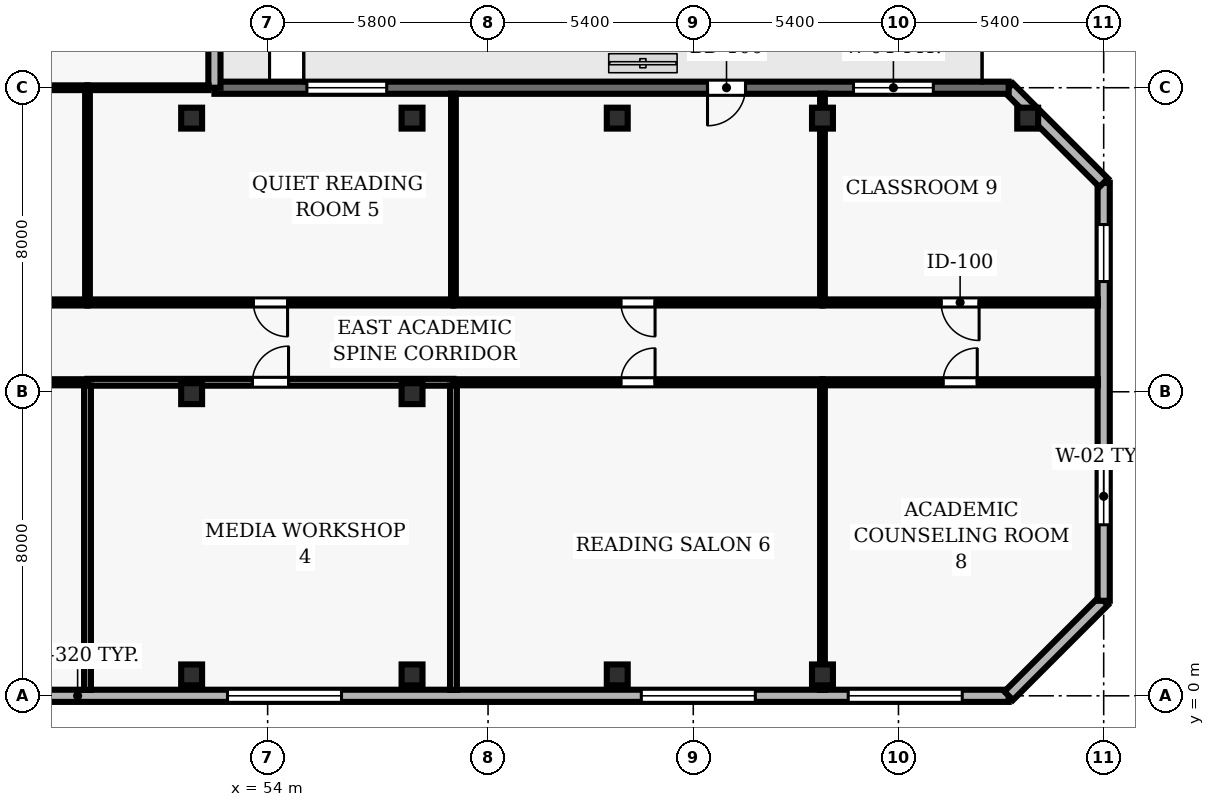
"""IFC4 building model, lengths in metres.
Left out: names, types, materials, properties, quantities, classifications, styles, units other than length and angle.
Written with IfcOpenShell. Run it as: python <this file> out.ifc"""

import sys

from ifc_helpers import new_model, si_unit, direction, frame, frame_2d, origin, origin_2d, place, context, subcontext, project, spatial, rectangle, hollow_rectangle, extrude, element, fill, save


model = new_model("IFC4")
c1 = context("Model", 3, precision=1e-05, world=origin(), true_north=direction((0.0, 1.0)))
c2 = subcontext(c1, "Body", "Model", "MODEL_VIEW")
j1 = project(units=[si_unit("LENGTHUNIT", "METRE"), si_unit("PLANEANGLEUNIT", "RADIAN")], contexts=[c1])
p1 = place(None, origin())
s1 = spatial("IfcSite", under=j1, at=p1, CompositionType="ELEMENT")
p2 = place(p1, origin())
s2 = spatial("IfcBuilding", under=s1, at=p2, CompositionType="ELEMENT")
p3 = place(p2, frame((0.0, 0.0, 50.5)))
s3 = spatial("IfcBuildingStorey", under=s2, at=p3, CompositionType="ELEMENT", Elevation=50.5)
for number, where, z_axis, x_axis in (
    (1, (52.0, 0.55, 0.0), (0.0, 0.0, 1.0), (1.0, 0.0, 0.0)),
    (2, (52.0, 7.95, 0.0), (0.0, 0.0, 1.0), (1.0, 0.0, 0.0)),
    (3, (52.0, 15.2, 0.0), (0.0, 0.0, 1.0), (1.0, 0.0, 0.0)),
    (4, (57.8, 0.55, 0.0), (0.0, 0.0, 1.0), (1.0, 0.0, 0.0)),
    (5, (57.8, 7.95, 0.0), (0.0, 0.0, 1.0), (1.0, 0.0, 0.0)),
    (6, (57.8, 15.2, 0.0), (0.0, 0.0, 1.0), (1.0, 0.0, 0.0)),
    (7, (63.2, 0.55, 0.0), (0.0, 0.0, 1.0), (1.0, 0.0, 0.0)),
    (8, (63.2, 15.2, 0.0), (0.0, 0.0, 1.0), (1.0, 0.0, 0.0)),
    (9, (68.6, 0.55, 0.0), (0.0, 0.0, 1.0), (1.0, 0.0, 0.0)),
    (10, (68.6, 15.2, 0.0), (0.0, 0.0, 1.0), (1.0, 0.0, 0.0)),
    (11, (74.0, 15.2, 0.0), (0.0, 0.0, 1.0), (1.0, 0.0, 0.0)),
):
    element("IfcColumn", number, at=place(p3, frame(where, z_axis=z_axis, x_axis=x_axis)), inside=s3, PredefinedType="COLUMN", context=c2, shape_type="SweptSolid", body=[
        extrude(hollow_rectangle(XDim=0.55, YDim=0.55, WallThickness=0.025, at=origin_2d()), origin(), (0.0, 0.0, 1.0), 3.9),
    ])
p4 = place(p3, frame((24.5, 0.0, 0.0), z_axis=(0.0, 0.0, 1.0), x_axis=(1.0, 0.0, 0.0)))
e12 = element("IfcWall", 12, at=p4, inside=s3, PredefinedType="SOLIDWALL", context=c2, shape_type="SweptSolid", body=[
    extrude(rectangle(XDim=49.0, YDim=0.32, at=frame_2d((24.5, 0.0))), origin(), (0.0, 0.0, 1.0), 3.69),
])
p5 = place(p4, frame((1.222, 0.0, 0.9)))
e13 = element("IfcOpeningElement", 13, at=p5, cuts=e12, PredefinedType="OPENING", context=c2, shape_type="SweptSolid", body=[
    extrude(rectangle(XDim=3.0, YDim=2.2, at=frame_2d((1.5, 1.1))), frame((0.0, 0.17, 0.0), z_axis=(0.0, -1.0, 0.0), x_axis=(1.0, 0.0, 0.0)), (0.0, 0.0, 1.0), 0.34),
])
p6 = place(p4, frame((17.556, 0.0, 0.9)))
e14 = element("IfcOpeningElement", 14, at=p6, cuts=e12, PredefinedType="OPENING", context=c2, shape_type="SweptSolid", body=[
    extrude(rectangle(XDim=3.0, YDim=2.2, at=frame_2d((1.5, 1.1))), frame((0.0, 0.17, 0.0), z_axis=(0.0, -1.0, 0.0), x_axis=(1.0, 0.0, 0.0)), (0.0, 0.0, 1.0), 0.34),
])
p7 = place(p4, frame((28.444, 0.0, 0.9)))
e15 = element("IfcOpeningElement", 15, at=p7, cuts=e12, PredefinedType="OPENING", context=c2, shape_type="SweptSolid", body=[
    extrude(rectangle(XDim=3.0, YDim=2.2, at=frame_2d((1.5, 1.1))), frame((0.0, 0.17, 0.0), z_axis=(0.0, -1.0, 0.0), x_axis=(1.0, 0.0, 0.0)), (0.0, 0.0, 1.0), 0.34),
])
p8 = place(p4, frame((39.333, 0.0, 0.9)))
e16 = element("IfcOpeningElement", 16, at=p8, cuts=e12, PredefinedType="OPENING", context=c2, shape_type="SweptSolid", body=[
    extrude(rectangle(XDim=3.0, YDim=2.2, at=frame_2d((1.5, 1.1))), frame((0.0, 0.17, 0.0), z_axis=(0.0, -1.0, 0.0), x_axis=(1.0, 0.0, 0.0)), (0.0, 0.0, 1.0), 0.34),
])
p9 = place(p4, frame((44.778, 0.0, 0.9)))
e17 = element("IfcOpeningElement", 17, at=p9, cuts=e12, PredefinedType="OPENING", context=c2, shape_type="SweptSolid", body=[
    extrude(rectangle(XDim=3.0, YDim=2.2, at=frame_2d((1.5, 1.1))), frame((0.0, 0.17, 0.0), z_axis=(0.0, -1.0, 0.0), x_axis=(1.0, 0.0, 0.0)), (0.0, 0.0, 1.0), 0.34),
])
p10 = place(p3, frame((73.5, 0.0, 0.0), z_axis=(0.0, 0.0, 1.0), x_axis=(0.707106781187, 0.707106781187, 0.0)))
e18 = element("IfcWall", 18, at=p10, inside=s3, PredefinedType="SOLIDWALL", context=c2, shape_type="SweptSolid", body=[
    extrude(rectangle(XDim=3.536, YDim=0.32, at=frame_2d((1.768, 0.0))), origin(), (0.0, 0.0, 1.0), 3.69),
])
p11 = place(p3, frame((76.0, 2.5, 0.0), z_axis=(0.0, 0.0, 1.0), x_axis=(0.0, 1.0, 0.0)))
e19 = element("IfcWall", 19, at=p11, inside=s3, PredefinedType="SOLIDWALL", context=c2, shape_type="SweptSolid", body=[
    extrude(rectangle(XDim=11.0, YDim=0.32, at=frame_2d((5.5, 0.0))), origin(), (0.0, 0.0, 1.0), 3.69),
])
p12 = place(p11, frame((2.0, 0.0, 0.9)))
e20 = element("IfcOpeningElement", 20, at=p12, cuts=e19, PredefinedType="OPENING", context=c2, shape_type="SweptSolid", body=[
    extrude(rectangle(XDim=1.5, YDim=1.6, at=frame_2d((0.75, 0.8))), frame((0.0, 0.17, 0.0), z_axis=(0.0, -1.0, 0.0), x_axis=(1.0, 0.0, 0.0)), (0.0, 0.0, 1.0), 0.34),
])
p13 = place(p11, frame((8.4, 0.0, 0.9)))
e21 = element("IfcOpeningElement", 21, at=p13, cuts=e19, PredefinedType="OPENING", context=c2, shape_type="SweptSolid", body=[
    extrude(rectangle(XDim=1.5, YDim=1.6, at=frame_2d((0.75, 0.8))), frame((0.0, 0.17, 0.0), z_axis=(0.0, -1.0, 0.0), x_axis=(1.0, 0.0, 0.0)), (0.0, 0.0, 1.0), 0.34),
])
p14 = place(p3, frame((76.0, 13.5, 0.0), z_axis=(0.0, 0.0, 1.0), x_axis=(-0.707106781187, 0.707106781187, 0.0)))
e22 = element("IfcWall", 22, at=p14, inside=s3, PredefinedType="SOLIDWALL", context=c2, shape_type="SweptSolid", body=[
    extrude(rectangle(XDim=3.536, YDim=0.32, at=frame_2d((1.768, 0.0))), origin(), (0.0, 0.0, 1.0), 3.69),
])
p15 = place(p3, frame((73.5, 16.0, 0.0), z_axis=(0.0, 0.0, 1.0), x_axis=(-1.0, 0.0, 0.0)))
e23 = element("IfcWall", 23, at=p15, inside=s3, PredefinedType="SOLIDWALL", context=c2, shape_type="SweptSolid", body=[
    extrude(rectangle(XDim=20.9, YDim=0.32, at=frame_2d((10.45, 0.0))), origin(), (0.0, 0.0, 1.0), 3.69),
])
p16 = place(p15, frame((6.925, 0.0, 0.0)))
e24 = element("IfcOpeningElement", 24, at=p16, cuts=e23, PredefinedType="OPENING", context=c2, shape_type="SweptSolid", body=[
    extrude(rectangle(XDim=1.0, YDim=2.2, at=frame_2d((0.5, 1.1))), frame((0.0, 0.17, 0.0), z_axis=(0.0, -1.0, 0.0), x_axis=(1.0, 0.0, 0.0)), (0.0, 0.0, 1.0), 0.34),
])
p17 = place(p15, frame((1.983, 0.0, 0.9)))
e25 = element("IfcOpeningElement", 25, at=p17, cuts=e23, PredefinedType="OPENING", context=c2, shape_type="SweptSolid", body=[
    extrude(rectangle(XDim=2.1, YDim=1.6, at=frame_2d((1.05, 0.8))), frame((0.0, 0.17, 0.0), z_axis=(0.0, -1.0, 0.0), x_axis=(1.0, 0.0, 0.0)), (0.0, 0.0, 1.0), 0.34),
])
p18 = place(p15, frame((16.367, 0.0, 0.9)))
e26 = element("IfcOpeningElement", 26, at=p18, cuts=e23, PredefinedType="OPENING", context=c2, shape_type="SweptSolid", body=[
    extrude(rectangle(XDim=2.1, YDim=1.6, at=frame_2d((1.05, 0.8))), frame((0.0, 0.17, 0.0), z_axis=(0.0, -1.0, 0.0), x_axis=(1.0, 0.0, 0.0)), (0.0, 0.0, 1.0), 0.34),
])
p19 = place(p3, frame((52.6, 16.0, 0.0), z_axis=(0.0, 0.0, 1.0), x_axis=(0.0, 1.0, 0.0)))
e27 = element("IfcWall", 27, at=p19, inside=s3, PredefinedType="SOLIDWALL", context=c2, shape_type="SweptSolid", body=[
    extrude(rectangle(XDim=10.095, YDim=0.32, at=frame_2d((5.047, 0.0))), origin(), (0.0, 0.0, 1.0), 3.69),
])
p20 = place(p19, frame((4.372, 0.0, 0.0)))
e28 = element("IfcOpeningElement", 28, at=p20, cuts=e27, PredefinedType="OPENING", context=c2, shape_type="SweptSolid", body=[
    extrude(rectangle(XDim=1.35, YDim=2.2, at=frame_2d((0.675, 1.1))), frame((0.0, 0.17, 0.0), z_axis=(0.0, -1.0, 0.0), x_axis=(1.0, 0.0, 0.0)), (0.0, 0.0, 1.0), 0.34),
])
p21 = place(p3, frame((40.35, 8.25, 0.0), z_axis=(0.0, 0.0, 1.0), x_axis=(1.0, 0.0, 0.0)))
e29 = element("IfcWall", 29, at=p21, inside=s3, PredefinedType="PARTITIONING", context=c2, shape_type="SweptSolid", body=[
    extrude(rectangle(XDim=8.91, YDim=0.16, at=frame_2d((4.455, 0.0))), origin(), (0.0, 0.0, 1.0), 3.055),
])
p22 = place(p21, frame((2.955, 0.0, 0.0)))
e30 = element("IfcOpeningElement", 30, at=p22, cuts=e29, PredefinedType="OPENING", context=c2, shape_type="SweptSolid", body=[
    extrude(rectangle(XDim=0.9, YDim=2.1, at=frame_2d((0.45, 1.05))), frame((0.0, 0.09, 0.0), z_axis=(0.0, -1.0, 0.0), x_axis=(1.0, 0.0, 0.0)), (0.0, 0.0, 1.0), 0.18),
])
p23 = place(p3, frame((49.26, 8.25, 0.0), z_axis=(0.0, 0.0, 1.0), x_axis=(1.0, 0.0, 0.0)))
e31 = element("IfcWall", 31, at=p23, inside=s3, PredefinedType="PARTITIONING", context=c2, shape_type="SweptSolid", body=[
    extrude(rectangle(XDim=9.63, YDim=0.18, at=frame_2d((4.815, 0.0))), origin(), (0.0, 0.0, 1.0), 3.055),
])
p24 = place(p23, frame((4.34, 0.0, 0.0)))
e32 = element("IfcOpeningElement", 32, at=p24, cuts=e31, PredefinedType="OPENING", context=c2, shape_type="SweptSolid", body=[
    extrude(rectangle(XDim=0.95, YDim=2.1, at=frame_2d((0.475, 1.05))), frame((0.0, 0.1, 0.0), z_axis=(0.0, -1.0, 0.0), x_axis=(1.0, 0.0, 0.0)), (0.0, 0.0, 1.0), 0.2),
])
p25 = place(p3, frame((49.26, 10.35, 0.0), z_axis=(0.0, 0.0, 1.0), x_axis=(-1.0, 0.0, 0.0)))
e33 = element("IfcWall", 33, at=p25, inside=s3, PredefinedType="PARTITIONING", context=c2, shape_type="SweptSolid", body=[
    extrude(rectangle(XDim=8.91, YDim=0.16, at=frame_2d((4.455, 0.0))), origin(), (0.0, 0.0, 1.0), 3.277),
])
p26 = place(p25, frame((4.005, 0.0, 0.0)))
e34 = element("IfcOpeningElement", 34, at=p26, cuts=e33, PredefinedType="OPENING", context=c2, shape_type="SweptSolid", body=[
    extrude(rectangle(XDim=0.9, YDim=2.1, at=frame_2d((0.45, 1.05))), frame((0.0, 0.09, 0.0), z_axis=(0.0, -1.0, 0.0), x_axis=(1.0, 0.0, 0.0)), (0.0, 0.0, 1.0), 0.18),
])
p27 = place(p3, frame((49.26, 16.0, 0.0), z_axis=(0.0, 0.0, 1.0), x_axis=(1.0, 0.0, 0.0)))
e35 = element("IfcWall", 35, at=p27, inside=s3, PredefinedType="PARTITIONING", context=c2, shape_type="SweptSolid", body=[
    extrude(rectangle(XDim=3.185, YDim=0.125, at=frame_2d((1.593, 0.0))), origin(), (0.0, 0.0, 1.0), 3.39),
])
p28 = place(p3, frame((49.26, 16.0, 0.0), z_axis=(0.0, 0.0, 1.0), x_axis=(-1.0, 0.0, 0.0)))
e36 = element("IfcWall", 36, at=p28, inside=s3, PredefinedType="PARTITIONING", context=c2, shape_type="SweptSolid", body=[
    extrude(rectangle(XDim=8.91, YDim=0.125, at=frame_2d((4.455, 0.0))), origin(), (0.0, 0.0, 1.0), 3.69),
])
p29 = place(p3, frame((58.89, 8.25, 0.0), z_axis=(0.0, 0.0, 1.0), x_axis=(1.0, 0.0, 0.0)))
e37 = element("IfcWall", 37, at=p29, inside=s3, PredefinedType="PARTITIONING", context=c2, shape_type="SweptSolid", body=[
    extrude(rectangle(XDim=9.71, YDim=0.16, at=frame_2d((4.855, 0.0))), origin(), (0.0, 0.0, 1.0), 3.69),
])
p30 = place(p29, frame((4.405, 0.0, 0.0)))
e38 = element("IfcOpeningElement", 38, at=p30, cuts=e37, PredefinedType="OPENING", context=c2, shape_type="SweptSolid", body=[
    extrude(rectangle(XDim=0.9, YDim=2.1, at=frame_2d((0.45, 1.05))), frame((0.0, 0.09, 0.0), z_axis=(0.0, -1.0, 0.0), x_axis=(1.0, 0.0, 0.0)), (0.0, 0.0, 1.0), 0.18),
])
p31 = place(p3, frame((58.89, 10.35, 0.0), z_axis=(0.0, 0.0, 1.0), x_axis=(-1.0, 0.0, 0.0)))
e39 = element("IfcWall", 39, at=p31, inside=s3, PredefinedType="PARTITIONING", context=c2, shape_type="SweptSolid", body=[
    extrude(rectangle(XDim=9.63, YDim=0.16, at=frame_2d((4.815, 0.0))), origin(), (0.0, 0.0, 1.0), 3.277),
])
p32 = place(p31, frame((4.365, 0.0, 0.0)))
e40 = element("IfcOpeningElement", 40, at=p32, cuts=e39, PredefinedType="OPENING", context=c2, shape_type="SweptSolid", body=[
    extrude(rectangle(XDim=0.9, YDim=2.1, at=frame_2d((0.45, 1.05))), frame((0.0, 0.09, 0.0), z_axis=(0.0, -1.0, 0.0), x_axis=(1.0, 0.0, 0.0)), (0.0, 0.0, 1.0), 0.18),
])
p33 = place(p3, frame((68.6, 8.25, 0.0), z_axis=(0.0, 0.0, 1.0), x_axis=(1.0, 0.0, 0.0)))
e41 = element("IfcWall", 41, at=p33, inside=s3, PredefinedType="PARTITIONING", context=c2, shape_type="SweptSolid", body=[
    extrude(rectangle(XDim=7.245, YDim=0.16, at=frame_2d((3.623, 0.0))), origin(), (0.0, 0.0, 1.0), 3.69),
])
p34 = place(p33, frame((3.173, 0.0, 0.0)))
e42 = element("IfcOpeningElement", 42, at=p34, cuts=e41, PredefinedType="OPENING", context=c2, shape_type="SweptSolid", body=[
    extrude(rectangle(XDim=0.9, YDim=2.1, at=frame_2d((0.45, 1.05))), frame((0.0, 0.09, 0.0), z_axis=(0.0, -1.0, 0.0), x_axis=(1.0, 0.0, 0.0)), (0.0, 0.0, 1.0), 0.18),
])
p35 = place(p3, frame((68.6, 10.35, 0.0), z_axis=(0.0, 0.0, 1.0), x_axis=(-1.0, 0.0, 0.0)))
e43 = element("IfcWall", 43, at=p35, inside=s3, PredefinedType="PARTITIONING", context=c2, shape_type="SweptSolid", body=[
    extrude(rectangle(XDim=9.71, YDim=0.16, at=frame_2d((4.855, 0.0))), origin(), (0.0, 0.0, 1.0), 3.277),
])
p36 = place(p35, frame((4.405, 0.0, 0.0)))
e44 = element("IfcOpeningElement", 44, at=p36, cuts=e43, PredefinedType="OPENING", context=c2, shape_type="SweptSolid", body=[
    extrude(rectangle(XDim=0.9, YDim=2.1, at=frame_2d((0.45, 1.05))), frame((0.0, 0.09, 0.0), z_axis=(0.0, -1.0, 0.0), x_axis=(1.0, 0.0, 0.0)), (0.0, 0.0, 1.0), 0.18),
])
p37 = place(p3, frame((75.845, 10.35, 0.0), z_axis=(0.0, 0.0, 1.0), x_axis=(-1.0, 0.0, 0.0)))
e45 = element("IfcWall", 45, at=p37, inside=s3, PredefinedType="PARTITIONING", context=c2, shape_type="SweptSolid", body=[
    extrude(rectangle(XDim=7.245, YDim=0.16, at=frame_2d((3.623, 0.0))), origin(), (0.0, 0.0, 1.0), 3.69),
])
p38 = place(p37, frame((3.123, 0.0, 0.0)))
e46 = element("IfcOpeningElement", 46, at=p38, cuts=e45, PredefinedType="OPENING", context=c2, shape_type="SweptSolid", body=[
    extrude(rectangle(XDim=1.0, YDim=2.1, at=frame_2d((0.5, 1.05))), frame((0.0, 0.09, 0.0), z_axis=(0.0, -1.0, 0.0), x_axis=(1.0, 0.0, 0.0)), (0.0, 0.0, 1.0), 0.18),
])
p39 = place(p3, frame((49.26, 0.155, 0.0), z_axis=(0.0, 0.0, 1.0), x_axis=(0.0, 1.0, 0.0)))
e47 = element("IfcWall", 47, at=p39, inside=s3, PredefinedType="PARTITIONING", context=c2, shape_type="SweptSolid", body=[
    extrude(rectangle(XDim=8.01, YDim=0.18, at=frame_2d((4.005, 0.0))), origin(), (0.0, 0.0, 1.0), 3.69),
])
p40 = place(p3, frame((49.26, 10.425, 0.0), z_axis=(0.0, 0.0, 1.0), x_axis=(0.0, 1.0, 0.0)))
e48 = element("IfcWall", 48, at=p40, inside=s3, PredefinedType="PARTITIONING", context=c2, shape_type="SweptSolid", body=[
    extrude(rectangle(XDim=5.518, YDim=0.125, at=frame_2d((2.759, 0.0))), origin(), (0.0, 0.0, 1.0), 3.69),
])
p41 = place(p3, frame((58.89, 0.155, 0.0), z_axis=(0.0, 0.0, 1.0), x_axis=(0.0, 1.0, 0.0)))
e49 = element("IfcWall", 49, at=p41, inside=s3, PredefinedType="PARTITIONING", context=c2, shape_type="SweptSolid", body=[
    extrude(rectangle(XDim=8.01, YDim=0.18, at=frame_2d((4.005, 0.0))), origin(), (0.0, 0.0, 1.0), 3.69),
])
p42 = place(p3, frame((58.89, 10.425, 0.0), z_axis=(0.0, 0.0, 1.0), x_axis=(0.0, 1.0, 0.0)))
e50 = element("IfcWall", 50, at=p42, inside=s3, PredefinedType="PARTITIONING", context=c2, shape_type="SweptSolid", body=[
    extrude(rectangle(XDim=5.42, YDim=0.125, at=frame_2d((2.71, 0.0))), origin(), (0.0, 0.0, 1.0), 3.69),
])
p43 = place(p3, frame((68.6, 0.155, 0.0), z_axis=(0.0, 0.0, 1.0), x_axis=(0.0, 1.0, 0.0)))
e51 = element("IfcWall", 51, at=p43, inside=s3, PredefinedType="PARTITIONING", context=c2, shape_type="SweptSolid", body=[
    extrude(rectangle(XDim=8.02, YDim=0.125, at=frame_2d((4.01, 0.0))), origin(), (0.0, 0.0, 1.0), 3.055),
])
p44 = place(p3, frame((68.6, 10.425, 0.0), z_axis=(0.0, 0.0, 1.0), x_axis=(0.0, 1.0, 0.0)))
e52 = element("IfcWall", 52, at=p44, inside=s3, PredefinedType="PARTITIONING", context=c2, shape_type="SweptSolid", body=[
    extrude(rectangle(XDim=5.42, YDim=0.125, at=frame_2d((2.71, 0.0))), origin(), (0.0, 0.0, 1.0), 3.055),
])
p45 = place(p7, origin())
e53 = element("IfcWindow", 53, at=p45, inside=s3, PartitioningType="SINGLE_PANEL", PredefinedType="WINDOW", context=c2, shape_type="SweptSolid", body=[
    extrude(rectangle(XDim=3.0, YDim=2.2, at=frame_2d((1.5, 1.1))), frame((0.0, 0.03, 0.0), z_axis=(0.0, -1.0, 0.0), x_axis=(1.0, 0.0, 0.0)), (0.0, 0.0, 1.0), 0.06),
])
fill(e15, e53)
p46 = place(p8, origin())
e54 = element("IfcWindow", 54, at=p46, inside=s3, PartitioningType="SINGLE_PANEL", PredefinedType="WINDOW", context=c2, shape_type="SweptSolid", body=[
    extrude(rectangle(XDim=3.0, YDim=2.2, at=frame_2d((1.5, 1.1))), frame((0.0, 0.03, 0.0), z_axis=(0.0, -1.0, 0.0), x_axis=(1.0, 0.0, 0.0)), (0.0, 0.0, 1.0), 0.06),
])
fill(e16, e54)
p47 = place(p9, origin())
e55 = element("IfcWindow", 55, at=p47, inside=s3, PartitioningType="SINGLE_PANEL", PredefinedType="WINDOW", context=c2, shape_type="SweptSolid", body=[
    extrude(rectangle(XDim=3.0, YDim=2.2, at=frame_2d((1.5, 1.1))), frame((0.0, 0.03, 0.0), z_axis=(0.0, -1.0, 0.0), x_axis=(1.0, 0.0, 0.0)), (0.0, 0.0, 1.0), 0.06),
])
fill(e17, e55)
p48 = place(p12, origin())
e56 = element("IfcWindow", 56, at=p48, inside=s3, PartitioningType="SINGLE_PANEL", PredefinedType="WINDOW", context=c2, shape_type="SweptSolid", body=[
    extrude(rectangle(XDim=1.5, YDim=1.6, at=frame_2d((0.75, 0.8))), frame((0.0, 0.03, 0.0), z_axis=(0.0, -1.0, 0.0), x_axis=(1.0, 0.0, 0.0)), (0.0, 0.0, 1.0), 0.06),
])
fill(e20, e56)
p49 = place(p13, origin())
e57 = element("IfcWindow", 57, at=p49, inside=s3, PartitioningType="SINGLE_PANEL", PredefinedType="WINDOW", context=c2, shape_type="SweptSolid", body=[
    extrude(rectangle(XDim=1.5, YDim=1.6, at=frame_2d((0.75, 0.8))), frame((0.0, 0.03, 0.0), z_axis=(0.0, -1.0, 0.0), x_axis=(1.0, 0.0, 0.0)), (0.0, 0.0, 1.0), 0.06),
])
fill(e21, e57)
p50 = place(p16, origin())
e58 = element("IfcDoor", 58, at=p50, inside=s3, OperationType="SINGLE_SWING_RIGHT", PredefinedType="DOOR", context=c2, shape_type="SweptSolid", body=[
    extrude(rectangle(XDim=1.0, YDim=2.2, at=frame_2d((0.5, 1.1))), frame((0.0, 0.025, 0.0), z_axis=(0.0, -1.0, 0.0), x_axis=(1.0, 0.0, 0.0)), (0.0, 0.0, 1.0), 0.05),
])
fill(e24, e58)
p51 = place(p17, origin())
e59 = element("IfcWindow", 59, at=p51, inside=s3, PartitioningType="SINGLE_PANEL", PredefinedType="WINDOW", context=c2, shape_type="SweptSolid", body=[
    extrude(rectangle(XDim=2.1, YDim=1.6, at=frame_2d((1.05, 0.8))), frame((0.0, 0.03, 0.0), z_axis=(0.0, -1.0, 0.0), x_axis=(1.0, 0.0, 0.0)), (0.0, 0.0, 1.0), 0.06),
])
fill(e25, e59)
p52 = place(p18, origin())
e60 = element("IfcWindow", 60, at=p52, inside=s3, PartitioningType="SINGLE_PANEL", PredefinedType="WINDOW", context=c2, shape_type="SweptSolid", body=[
    extrude(rectangle(XDim=2.1, YDim=1.6, at=frame_2d((1.05, 0.8))), frame((0.0, 0.03, 0.0), z_axis=(0.0, -1.0, 0.0), x_axis=(1.0, 0.0, 0.0)), (0.0, 0.0, 1.0), 0.06),
])
fill(e26, e60)
p53 = place(p24, origin())
e61 = element("IfcDoor", 61, at=p53, inside=s3, OperationType="SINGLE_SWING_RIGHT", PredefinedType="DOOR", context=c2, shape_type="SweptSolid", body=[
    extrude(rectangle(XDim=0.95, YDim=2.1, at=frame_2d((0.475, 1.05))), frame((0.0, 0.025, 0.0), z_axis=(0.0, -1.0, 0.0), x_axis=(1.0, 0.0, 0.0)), (0.0, 0.0, 1.0), 0.05),
])
fill(e32, e61)
p54 = place(p32, origin())
e62 = element("IfcDoor", 62, at=p54, inside=s3, OperationType="SINGLE_SWING_LEFT", PredefinedType="DOOR", context=c2, shape_type="SweptSolid", body=[
    extrude(rectangle(XDim=0.9, YDim=2.1, at=frame_2d((0.45, 1.05))), frame((0.0, 0.025, 0.0), z_axis=(0.0, -1.0, 0.0), x_axis=(1.0, 0.0, 0.0)), (0.0, 0.0, 1.0), 0.05),
])
fill(e40, e62)
p55 = place(p30, origin())
e63 = element("IfcDoor", 63, at=p55, inside=s3, OperationType="SINGLE_SWING_RIGHT", PredefinedType="DOOR", context=c2, shape_type="SweptSolid", body=[
    extrude(rectangle(XDim=0.9, YDim=2.1, at=frame_2d((0.45, 1.05))), frame((0.0, 0.025, 0.0), z_axis=(0.0, -1.0, 0.0), x_axis=(1.0, 0.0, 0.0)), (0.0, 0.0, 1.0), 0.05),
])
fill(e38, e63)
p56 = place(p36, origin())
e64 = element("IfcDoor", 64, at=p56, inside=s3, OperationType="SINGLE_SWING_LEFT", PredefinedType="DOOR", context=c2, shape_type="SweptSolid", body=[
    extrude(rectangle(XDim=0.9, YDim=2.1, at=frame_2d((0.45, 1.05))), frame((0.0, 0.025, 0.0), z_axis=(0.0, -1.0, 0.0), x_axis=(1.0, 0.0, 0.0)), (0.0, 0.0, 1.0), 0.05),
])
fill(e44, e64)
p57 = place(p34, origin())
e65 = element("IfcDoor", 65, at=p57, inside=s3, OperationType="SINGLE_SWING_RIGHT", PredefinedType="DOOR", context=c2, shape_type="SweptSolid", body=[
    extrude(rectangle(XDim=0.9, YDim=2.1, at=frame_2d((0.45, 1.05))), frame((0.0, 0.025, 0.0), z_axis=(0.0, -1.0, 0.0), x_axis=(1.0, 0.0, 0.0)), (0.0, 0.0, 1.0), 0.05),
])
fill(e42, e65)
p58 = place(p38, origin())
e66 = element("IfcDoor", 66, at=p58, inside=s3, OperationType="SINGLE_SWING_LEFT", PredefinedType="DOOR", context=c2, shape_type="SweptSolid", body=[
    extrude(rectangle(XDim=1.0, YDim=2.1, at=frame_2d((0.5, 1.05))), frame((0.0, 0.025, 0.0), z_axis=(0.0, -1.0, 0.0), x_axis=(1.0, 0.0, 0.0)), (0.0, 0.0, 1.0), 0.05),
])
fill(e46, e66)
save(model, sys.argv[1])
